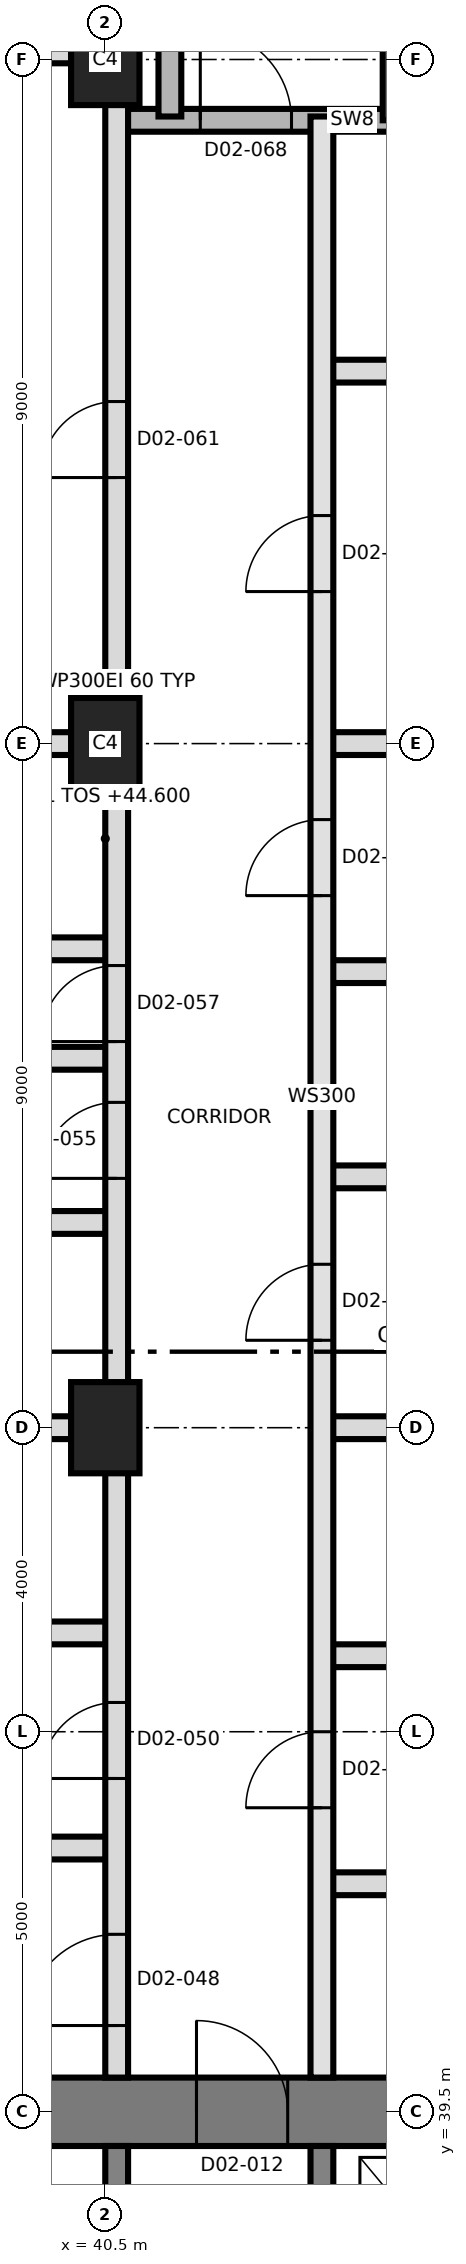
"""IFC4 building model, lengths in metres.
Left out: names, types, materials, properties, quantities, classifications, styles, units other than length and angle.
Written with IfcOpenShell. Run it as: python <this file> out.ifc"""

import sys

from ifc_helpers import new_model, si_unit, direction, frame, frame_2d, origin, origin_2d, place, context, subcontext, project, spatial, rectangle, extrude, element, fill, save


model = new_model("IFC4")
c1 = context("Model", 3, precision=1e-05, world=origin(), true_north=direction((0.0, 1.0)))
c2 = subcontext(c1, "Body", "Model", "MODEL_VIEW")
j1 = project(units=[si_unit("LENGTHUNIT", "METRE"), si_unit("PLANEANGLEUNIT", "RADIAN")], contexts=[c1])
p1 = place(None, origin())
s1 = spatial("IfcSite", under=j1, at=p1, CompositionType="ELEMENT")
p2 = place(p1, origin())
s2 = spatial("IfcBuilding", under=s1, at=p2, CompositionType="ELEMENT")
p3 = place(p2, frame((0.0, 0.0, 44.6)))
s3 = spatial("IfcBuildingStorey", under=s2, at=p3, CompositionType="ELEMENT", Elevation=44.6)
p4 = place(p3, frame((31.05, 39.5, 0.0), z_axis=(0.0, 0.0, 1.0), x_axis=(1.0, 0.0, 0.0)))
e1 = element("IfcWall", 1, at=p4, inside=s3, PredefinedType="SHEAR", context=c2, shape_type="SweptSolid", body=[
    extrude(rectangle(XDim=27.0, YDim=0.9, at=frame_2d((13.5, 0.0))), origin(), (0.0, 0.0, 1.0), 3.7),
])
p5 = place(p4, frame((10.65, 0.0, 0.0)))
e2 = element("IfcOpeningElement", 2, at=p5, cuts=e1, PredefinedType="OPENING", context=c2, shape_type="SweptSolid", body=[
    extrude(rectangle(XDim=1.2, YDim=2.1, at=frame_2d((0.6, 1.05))), frame((0.0, 0.46, 0.0), z_axis=(0.0, -1.0, 0.0), x_axis=(1.0, 0.0, 0.0)), (0.0, 0.0, 1.0), 0.92),
])
for number, where, z_axis, x_axis in (
    (3, (40.65, 33.5, 0.0), (0.0, 0.0, 1.0), (0.0, 1.0, 0.0)),
    (4, (43.35, 33.5, 0.0), (0.0, 0.0, 1.0), (0.0, 1.0, 0.0)),
):
    element("IfcWall", number, at=place(p3, frame(where, z_axis=z_axis, x_axis=x_axis)), inside=s3, PredefinedType="SHEAR", context=c2, shape_type="SweptSolid", body=[
        extrude(rectangle(XDim=5.55, YDim=0.3, at=frame_2d((2.775, 0.0))), origin(), (0.0, 0.0, 1.0), 3.7),
    ])
for number, where, z_axis, x_axis in (
    (5, (40.5, 48.5, 0.0), (0.0, 0.0, 1.0), (0.0, 1.0, 0.0)),
    (6, (40.5, 57.5, 0.0), (0.0, 0.0, 1.0), (0.0, 1.0, 0.0)),
    (7, (40.5, 66.5, 0.0), (0.0, 0.0, 1.0), (0.0, 1.0, 0.0)),
):
    element("IfcColumn", number, at=place(p3, frame(where, z_axis=z_axis, x_axis=x_axis)), inside=s3, PredefinedType="COLUMN", context=c2, shape_type="SweptSolid", body=[
        extrude(rectangle(XDim=1.2, YDim=0.9, at=origin_2d()), origin(), (0.0, 0.0, 1.0), 3.7),
    ])
p6 = place(p3, frame((43.35, 42.5, 0.0), z_axis=(0.0, 0.0, 1.0), x_axis=(1.0, 0.0, 0.0)))
e8 = element("IfcWall", 8, at=p6, inside=s3, PredefinedType="PARTITIONING", context=c2, shape_type="SweptSolid", body=[
    extrude(rectangle(XDim=3.3, YDim=0.3, at=frame_2d((1.65, 0.0))), origin(), (0.0, 0.0, 1.0), 3.4),
])
p7 = place(p3, frame((30.565, 42.97, 0.0), z_axis=(0.0, 0.0, 1.0), x_axis=(1.0, 0.0, 0.0)))
e9 = element("IfcWall", 9, at=p7, inside=s3, PredefinedType="PARTITIONING", context=c2, shape_type="SweptSolid", body=[
    extrude(rectangle(XDim=10.085, YDim=0.3, at=frame_2d((5.042, 0.0))), origin(), (0.0, 0.0, 1.0), 3.4),
])
p8 = place(p3, frame((43.35, 45.5, 0.0), z_axis=(0.0, 0.0, 1.0), x_axis=(1.0, 0.0, 0.0)))
e10 = element("IfcWall", 10, at=p8, inside=s3, PredefinedType="PARTITIONING", context=c2, shape_type="SweptSolid", body=[
    extrude(rectangle(XDim=3.3, YDim=0.3, at=frame_2d((1.65, 0.0))), origin(), (0.0, 0.0, 1.0), 3.4),
])
p9 = place(p3, frame((37.45, 45.8, 0.0), z_axis=(0.0, 0.0, 1.0), x_axis=(1.0, 0.0, 0.0)))
e11 = element("IfcWall", 11, at=p9, inside=s3, PredefinedType="PARTITIONING", context=c2, shape_type="SweptSolid", body=[
    extrude(rectangle(XDim=3.2, YDim=0.3, at=frame_2d((1.6, 0.0))), origin(), (0.0, 0.0, 1.0), 3.4),
])
p10 = place(p3, frame((30.565, 48.5, 0.0), z_axis=(0.0, 0.0, 1.0), x_axis=(1.0, 0.0, 0.0)))
e12 = element("IfcWall", 12, at=p10, inside=s3, PredefinedType="PARTITIONING", context=c2, shape_type="SweptSolid", body=[
    extrude(rectangle(XDim=10.085, YDim=0.3, at=frame_2d((5.042, 0.0))), origin(), (0.0, 0.0, 1.0), 3.4),
])
p11 = place(p3, frame((43.35, 48.5, 0.0), z_axis=(0.0, 0.0, 1.0), x_axis=(1.0, 0.0, 0.0)))
e13 = element("IfcWall", 13, at=p11, inside=s3, PredefinedType="PARTITIONING", context=c2, shape_type="SweptSolid", body=[
    extrude(rectangle(XDim=7.265, YDim=0.3, at=frame_2d((3.632, 0.0))), origin(), (0.0, 0.0, 1.0), 3.4),
])
for number, where, z_axis, x_axis in (
    (14, (37.45, 51.2, 0.0), (0.0, 0.0, 1.0), (1.0, 0.0, 0.0)),
    (15, (43.35, 51.8, 0.0), (0.0, 0.0, 1.0), (1.0, 0.0, 0.0)),
):
    element("IfcWall", number, at=place(p3, frame(where, z_axis=z_axis, x_axis=x_axis)), inside=s3, PredefinedType="PARTITIONING", context=c2, shape_type="SweptSolid", body=[
        extrude(rectangle(XDim=3.2, YDim=0.3, at=frame_2d((1.6, 0.0))), origin(), (0.0, 0.0, 1.0), 3.4),
    ])
p12 = place(p3, frame((30.565, 53.36, 0.0), z_axis=(0.0, 0.0, 1.0), x_axis=(1.0, 0.0, 0.0)))
e16 = element("IfcWall", 16, at=p12, inside=s3, PredefinedType="PARTITIONING", context=c2, shape_type="SweptSolid", body=[
    extrude(rectangle(XDim=10.085, YDim=0.3, at=frame_2d((5.042, 0.0))), origin(), (0.0, 0.0, 1.0), 3.4),
])
p13 = place(p3, frame((43.35, 54.5, 0.0), z_axis=(0.0, 0.0, 1.0), x_axis=(1.0, 0.0, 0.0)))
e17 = element("IfcWall", 17, at=p13, inside=s3, PredefinedType="PARTITIONING", context=c2, shape_type="SweptSolid", body=[
    extrude(rectangle(XDim=7.265, YDim=0.3, at=frame_2d((3.632, 0.0))), origin(), (0.0, 0.0, 1.0), 3.4),
])
p14 = place(p3, frame((37.45, 54.8, 0.0), z_axis=(0.0, 0.0, 1.0), x_axis=(1.0, 0.0, 0.0)))
e18 = element("IfcWall", 18, at=p14, inside=s3, PredefinedType="PARTITIONING", context=c2, shape_type="SweptSolid", body=[
    extrude(rectangle(XDim=3.2, YDim=0.3, at=frame_2d((1.6, 0.0))), origin(), (0.0, 0.0, 1.0), 3.4),
])
p15 = place(p3, frame((30.565, 57.5, 0.0), z_axis=(0.0, 0.0, 1.0), x_axis=(1.0, 0.0, 0.0)))
e19 = element("IfcWall", 19, at=p15, inside=s3, PredefinedType="PARTITIONING", context=c2, shape_type="SweptSolid", body=[
    extrude(rectangle(XDim=10.085, YDim=0.3, at=frame_2d((5.042, 0.0))), origin(), (0.0, 0.0, 1.0), 3.4),
])
p16 = place(p3, frame((43.35, 57.5, 0.0), z_axis=(0.0, 0.0, 1.0), x_axis=(1.0, 0.0, 0.0)))
e20 = element("IfcWall", 20, at=p16, inside=s3, PredefinedType="PARTITIONING", context=c2, shape_type="SweptSolid", body=[
    extrude(rectangle(XDim=7.265, YDim=0.3, at=frame_2d((3.632, 0.0))), origin(), (0.0, 0.0, 1.0), 3.4),
])
p17 = place(p3, frame((43.35, 62.4, 0.0), z_axis=(0.0, 0.0, 1.0), x_axis=(1.0, 0.0, 0.0)))
e21 = element("IfcWall", 21, at=p17, inside=s3, PredefinedType="PARTITIONING", context=c2, shape_type="SweptSolid", body=[
    extrude(rectangle(XDim=7.265, YDim=0.3, at=frame_2d((3.632, 0.0))), origin(), (0.0, 0.0, 1.0), 3.4),
])
p18 = place(p17, frame((4.65, 0.0, 0.0)))
e22 = element("IfcOpeningElement", 22, at=p18, cuts=e21, PredefinedType="OPENING", context=c2, shape_type="SweptSolid", body=[
    extrude(rectangle(XDim=1.0, YDim=2.1, at=frame_2d((0.5, 1.05))), frame((0.0, 0.16, 0.0), z_axis=(0.0, -1.0, 0.0), x_axis=(1.0, 0.0, 0.0)), (0.0, 0.0, 1.0), 0.32),
])
p19 = place(p3, frame((40.65, 65.7, 0.0), z_axis=(0.0, 0.0, 1.0), x_axis=(1.0, 0.0, 0.0)))
e23 = element("IfcWall", 23, at=p19, inside=s3, PredefinedType="SHEAR", context=c2, shape_type="SweptSolid", body=[
    extrude(rectangle(XDim=6.2, YDim=0.3, at=frame_2d((3.1, 0.0))), origin(), (0.0, 0.0, 1.0), 3.4),
])
p20 = place(p19, frame((1.1, 0.0, 0.0)))
e24 = element("IfcOpeningElement", 24, at=p20, cuts=e23, PredefinedType="OPENING", context=c2, shape_type="SweptSolid", body=[
    extrude(rectangle(XDim=1.2, YDim=2.1, at=frame_2d((0.6, 1.05))), frame((0.0, 0.16, 0.0), z_axis=(0.0, -1.0, 0.0), x_axis=(1.0, 0.0, 0.0)), (0.0, 0.0, 1.0), 0.32),
])
p21 = place(p3, frame((30.565, 66.6, 0.0), z_axis=(0.0, 0.0, 1.0), x_axis=(1.0, 0.0, 0.0)))
e25 = element("IfcWall", 25, at=p21, inside=s3, PredefinedType="PARTITIONING", context=c2, shape_type="SweptSolid", body=[
    extrude(rectangle(XDim=10.085, YDim=0.3, at=frame_2d((5.042, 0.0))), origin(), (0.0, 0.0, 1.0), 3.4),
])
p22 = place(p21, frame((4.435, 0.0, 0.0)))
e26 = element("IfcOpeningElement", 26, at=p22, cuts=e25, PredefinedType="OPENING", context=c2, shape_type="SweptSolid", body=[
    extrude(rectangle(XDim=1.0, YDim=2.1, at=frame_2d((0.5, 1.05))), frame((0.0, 0.16, 0.0), z_axis=(0.0, -1.0, 0.0), x_axis=(1.0, 0.0, 0.0)), (0.0, 0.0, 1.0), 0.32),
])
p23 = place(p3, frame((40.65, 39.95, 0.0), z_axis=(0.0, 0.0, 1.0), x_axis=(0.0, 1.0, 0.0)))
e27 = element("IfcWall", 27, at=p23, inside=s3, PredefinedType="PARTITIONING", context=c2, shape_type="SweptSolid", body=[
    extrude(rectangle(XDim=36.725, YDim=0.3, at=frame_2d((18.363, 0.0))), origin(), (0.0, 0.0, 1.0), 3.4),
])
p24 = place(p23, frame((0.685, 0.0, 0.0)))
e28 = element("IfcOpeningElement", 28, at=p24, cuts=e27, PredefinedType="OPENING", context=c2, shape_type="SweptSolid", body=[
    extrude(rectangle(XDim=1.2, YDim=2.1, at=frame_2d((0.6, 1.05))), frame((0.0, 0.16, 0.0), z_axis=(0.0, -1.0, 0.0), x_axis=(1.0, 0.0, 0.0)), (0.0, 0.0, 1.0), 0.32),
])
p25 = place(p23, frame((3.935, 0.0, 0.0)))
e29 = element("IfcOpeningElement", 29, at=p25, cuts=e27, PredefinedType="OPENING", context=c2, shape_type="SweptSolid", body=[
    extrude(rectangle(XDim=1.0, YDim=2.1, at=frame_2d((0.5, 1.05))), frame((0.0, 0.16, 0.0), z_axis=(0.0, -1.0, 0.0), x_axis=(1.0, 0.0, 0.0)), (0.0, 0.0, 1.0), 0.32),
])
p26 = place(p23, frame((11.83, 0.0, 0.0)))
e30 = element("IfcOpeningElement", 30, at=p26, cuts=e27, PredefinedType="OPENING", context=c2, shape_type="SweptSolid", body=[
    extrude(rectangle(XDim=1.0, YDim=2.1, at=frame_2d((0.5, 1.05))), frame((0.0, 0.16, 0.0), z_axis=(0.0, -1.0, 0.0), x_axis=(1.0, 0.0, 0.0)), (0.0, 0.0, 1.0), 0.32),
])
p27 = place(p23, frame((13.63, 0.0, 0.0)))
e31 = element("IfcOpeningElement", 31, at=p27, cuts=e27, PredefinedType="OPENING", context=c2, shape_type="SweptSolid", body=[
    extrude(rectangle(XDim=1.0, YDim=2.1, at=frame_2d((0.5, 1.05))), frame((0.0, 0.16, 0.0), z_axis=(0.0, -1.0, 0.0), x_axis=(1.0, 0.0, 0.0)), (0.0, 0.0, 1.0), 0.32),
])
p28 = place(p23, frame((21.05, 0.0, 0.0)))
e32 = element("IfcOpeningElement", 32, at=p28, cuts=e27, PredefinedType="OPENING", context=c2, shape_type="SweptSolid", body=[
    extrude(rectangle(XDim=1.0, YDim=2.4, at=frame_2d((0.5, 1.2))), frame((0.0, 0.16, 0.0), z_axis=(0.0, -1.0, 0.0), x_axis=(1.0, 0.0, 0.0)), (0.0, 0.0, 1.0), 0.32),
])
p29 = place(p3, frame((41.35, 65.75, 0.0), z_axis=(0.0, 0.0, 1.0), x_axis=(0.0, 1.0, 0.0)))
e33 = element("IfcWall", 33, at=p29, inside=s3, PredefinedType="SHEAR", context=c2, shape_type="SweptSolid", body=[
    extrude(rectangle(XDim=8.85, YDim=0.3, at=frame_2d((4.425, 0.0))), origin(), (0.0, 0.0, 1.0), 3.4),
])
p30 = place(p3, frame((43.35, 39.95, 0.0), z_axis=(0.0, 0.0, 1.0), x_axis=(0.0, 1.0, 0.0)))
e34 = element("IfcWall", 34, at=p30, inside=s3, PredefinedType="SOLIDWALL", context=c2, shape_type="SweptSolid", body=[
    extrude(rectangle(XDim=25.8, YDim=0.3, at=frame_2d((12.9, 0.0))), origin(), (0.0, 0.0, 1.0), 3.4),
])
p31 = place(p30, frame((3.55, 0.0, 0.0)))
e35 = element("IfcOpeningElement", 35, at=p31, cuts=e34, PredefinedType="OPENING", context=c2, shape_type="SweptSolid", body=[
    extrude(rectangle(XDim=1.0, YDim=2.4, at=frame_2d((0.5, 1.2))), frame((0.0, 0.16, 0.0), z_axis=(0.0, -1.0, 0.0), x_axis=(1.0, 0.0, 0.0)), (0.0, 0.0, 1.0), 0.32),
])
p32 = place(p30, frame((9.7, 0.0, 0.0)))
e36 = element("IfcOpeningElement", 36, at=p32, cuts=e34, PredefinedType="OPENING", context=c2, shape_type="SweptSolid", body=[
    extrude(rectangle(XDim=1.0, YDim=2.1, at=frame_2d((0.5, 1.05))), frame((0.0, 0.16, 0.0), z_axis=(0.0, -1.0, 0.0), x_axis=(1.0, 0.0, 0.0)), (0.0, 0.0, 1.0), 0.32),
])
p33 = place(p30, frame((15.55, 0.0, 0.0)))
e37 = element("IfcOpeningElement", 37, at=p33, cuts=e34, PredefinedType="OPENING", context=c2, shape_type="SweptSolid", body=[
    extrude(rectangle(XDim=1.0, YDim=2.1, at=frame_2d((0.5, 1.05))), frame((0.0, 0.16, 0.0), z_axis=(0.0, -1.0, 0.0), x_axis=(1.0, 0.0, 0.0)), (0.0, 0.0, 1.0), 0.32),
])
p34 = place(p30, frame((19.55, 0.0, 0.0)))
e38 = element("IfcOpeningElement", 38, at=p34, cuts=e34, PredefinedType="OPENING", context=c2, shape_type="SweptSolid", body=[
    extrude(rectangle(XDim=1.0, YDim=2.4, at=frame_2d((0.5, 1.2))), frame((0.0, 0.16, 0.0), z_axis=(0.0, -1.0, 0.0), x_axis=(1.0, 0.0, 0.0)), (0.0, 0.0, 1.0), 0.32),
])
p35 = place(p3, frame((44.3, 65.7, 0.0), z_axis=(0.0, 0.0, 1.0), x_axis=(0.0, 1.0, 0.0)))
e39 = element("IfcWall", 39, at=p35, inside=s3, PredefinedType="SHEAR", context=c2, shape_type="SweptSolid", body=[
    extrude(rectangle(XDim=8.9, YDim=0.3, at=frame_2d((4.45, 0.0))), origin(), (0.0, 0.0, 1.0), 3.4),
])
p36 = place(p5, origin())
e40 = element("IfcDoor", 40, at=p36, inside=s3, OperationType="SINGLE_SWING_RIGHT", PredefinedType="DOOR", context=c2, shape_type="SweptSolid", body=[
    extrude(rectangle(XDim=1.2, YDim=2.1, at=frame_2d((0.6, 1.05))), frame((0.0, 0.025, 0.0), z_axis=(0.0, -1.0, 0.0), x_axis=(1.0, 0.0, 0.0)), (0.0, 0.0, 1.0), 0.05),
])
fill(e2, e40)
p37 = place(p31, origin())
e41 = element("IfcDoor", 41, at=p37, inside=s3, OperationType="SINGLE_SWING_LEFT", PredefinedType="DOOR", context=c2, shape_type="SweptSolid", body=[
    extrude(rectangle(XDim=1.0, YDim=2.4, at=frame_2d((0.5, 1.2))), frame((0.0, 0.025, 0.0), z_axis=(0.0, -1.0, 0.0), x_axis=(1.0, 0.0, 0.0)), (0.0, 0.0, 1.0), 0.05),
])
fill(e35, e41)
p38 = place(p24, origin())
e42 = element("IfcDoor", 42, at=p38, inside=s3, OperationType="SINGLE_SWING_LEFT", PredefinedType="DOOR", context=c2, shape_type="SweptSolid", body=[
    extrude(rectangle(XDim=1.2, YDim=2.1, at=frame_2d((0.6, 1.05))), frame((0.0, 0.025, 0.0), z_axis=(0.0, -1.0, 0.0), x_axis=(1.0, 0.0, 0.0)), (0.0, 0.0, 1.0), 0.05),
])
fill(e28, e42)
p39 = place(p25, origin())
e43 = element("IfcDoor", 43, at=p39, inside=s3, OperationType="SINGLE_SWING_RIGHT", PredefinedType="DOOR", context=c2, shape_type="SweptSolid", body=[
    extrude(rectangle(XDim=1.0, YDim=2.1, at=frame_2d((0.5, 1.05))), frame((0.0, 0.025, 0.0), z_axis=(0.0, -1.0, 0.0), x_axis=(1.0, 0.0, 0.0)), (0.0, 0.0, 1.0), 0.05),
])
fill(e29, e43)
p40 = place(p32, origin())
e44 = element("IfcDoor", 44, at=p40, inside=s3, OperationType="SINGLE_SWING_LEFT", PredefinedType="DOOR", context=c2, shape_type="SweptSolid", body=[
    extrude(rectangle(XDim=1.0, YDim=2.1, at=frame_2d((0.5, 1.05))), frame((0.0, 0.025, 0.0), z_axis=(0.0, -1.0, 0.0), x_axis=(1.0, 0.0, 0.0)), (0.0, 0.0, 1.0), 0.05),
])
fill(e36, e44)
p41 = place(p33, origin())
e45 = element("IfcDoor", 45, at=p41, inside=s3, OperationType="SINGLE_SWING_LEFT", PredefinedType="DOOR", context=c2, shape_type="SweptSolid", body=[
    extrude(rectangle(XDim=1.0, YDim=2.1, at=frame_2d((0.5, 1.05))), frame((0.0, 0.025, 0.0), z_axis=(0.0, -1.0, 0.0), x_axis=(1.0, 0.0, 0.0)), (0.0, 0.0, 1.0), 0.05),
])
fill(e37, e45)
p42 = place(p26, origin())
e46 = element("IfcDoor", 46, at=p42, inside=s3, OperationType="SINGLE_SWING_LEFT", PredefinedType="DOOR", context=c2, shape_type="SweptSolid", body=[
    extrude(rectangle(XDim=1.0, YDim=2.1, at=frame_2d((0.5, 1.05))), frame((0.0, 0.025, 0.0), z_axis=(0.0, -1.0, 0.0), x_axis=(1.0, 0.0, 0.0)), (0.0, 0.0, 1.0), 0.05),
])
fill(e30, e46)
p43 = place(p27, origin())
e47 = element("IfcDoor", 47, at=p43, inside=s3, OperationType="SINGLE_SWING_LEFT", PredefinedType="DOOR", context=c2, shape_type="SweptSolid", body=[
    extrude(rectangle(XDim=1.0, YDim=2.1, at=frame_2d((0.5, 1.05))), frame((0.0, 0.025, 0.0), z_axis=(0.0, -1.0, 0.0), x_axis=(1.0, 0.0, 0.0)), (0.0, 0.0, 1.0), 0.05),
])
fill(e31, e47)
p44 = place(p34, origin())
e48 = element("IfcDoor", 48, at=p44, inside=s3, OperationType="SINGLE_SWING_RIGHT", PredefinedType="DOOR", context=c2, shape_type="SweptSolid", body=[
    extrude(rectangle(XDim=1.0, YDim=2.4, at=frame_2d((0.5, 1.2))), frame((0.0, 0.025, 0.0), z_axis=(0.0, -1.0, 0.0), x_axis=(1.0, 0.0, 0.0)), (0.0, 0.0, 1.0), 0.05),
])
fill(e38, e48)
p45 = place(p28, origin())
e49 = element("IfcDoor", 49, at=p45, inside=s3, OperationType="SINGLE_SWING_RIGHT", PredefinedType="DOOR", context=c2, shape_type="SweptSolid", body=[
    extrude(rectangle(XDim=1.0, YDim=2.4, at=frame_2d((0.5, 1.2))), frame((0.0, 0.025, 0.0), z_axis=(0.0, -1.0, 0.0), x_axis=(1.0, 0.0, 0.0)), (0.0, 0.0, 1.0), 0.05),
])
fill(e32, e49)
p46 = place(p20, origin())
e50 = element("IfcDoor", 50, at=p46, inside=s3, OperationType="SINGLE_SWING_RIGHT", PredefinedType="DOOR", context=c2, shape_type="SweptSolid", body=[
    extrude(rectangle(XDim=1.2, YDim=2.1, at=frame_2d((0.6, 1.05))), frame((0.0, 0.025, 0.0), z_axis=(0.0, -1.0, 0.0), x_axis=(1.0, 0.0, 0.0)), (0.0, 0.0, 1.0), 0.05),
])
fill(e24, e50)
save(model, sys.argv[1])
